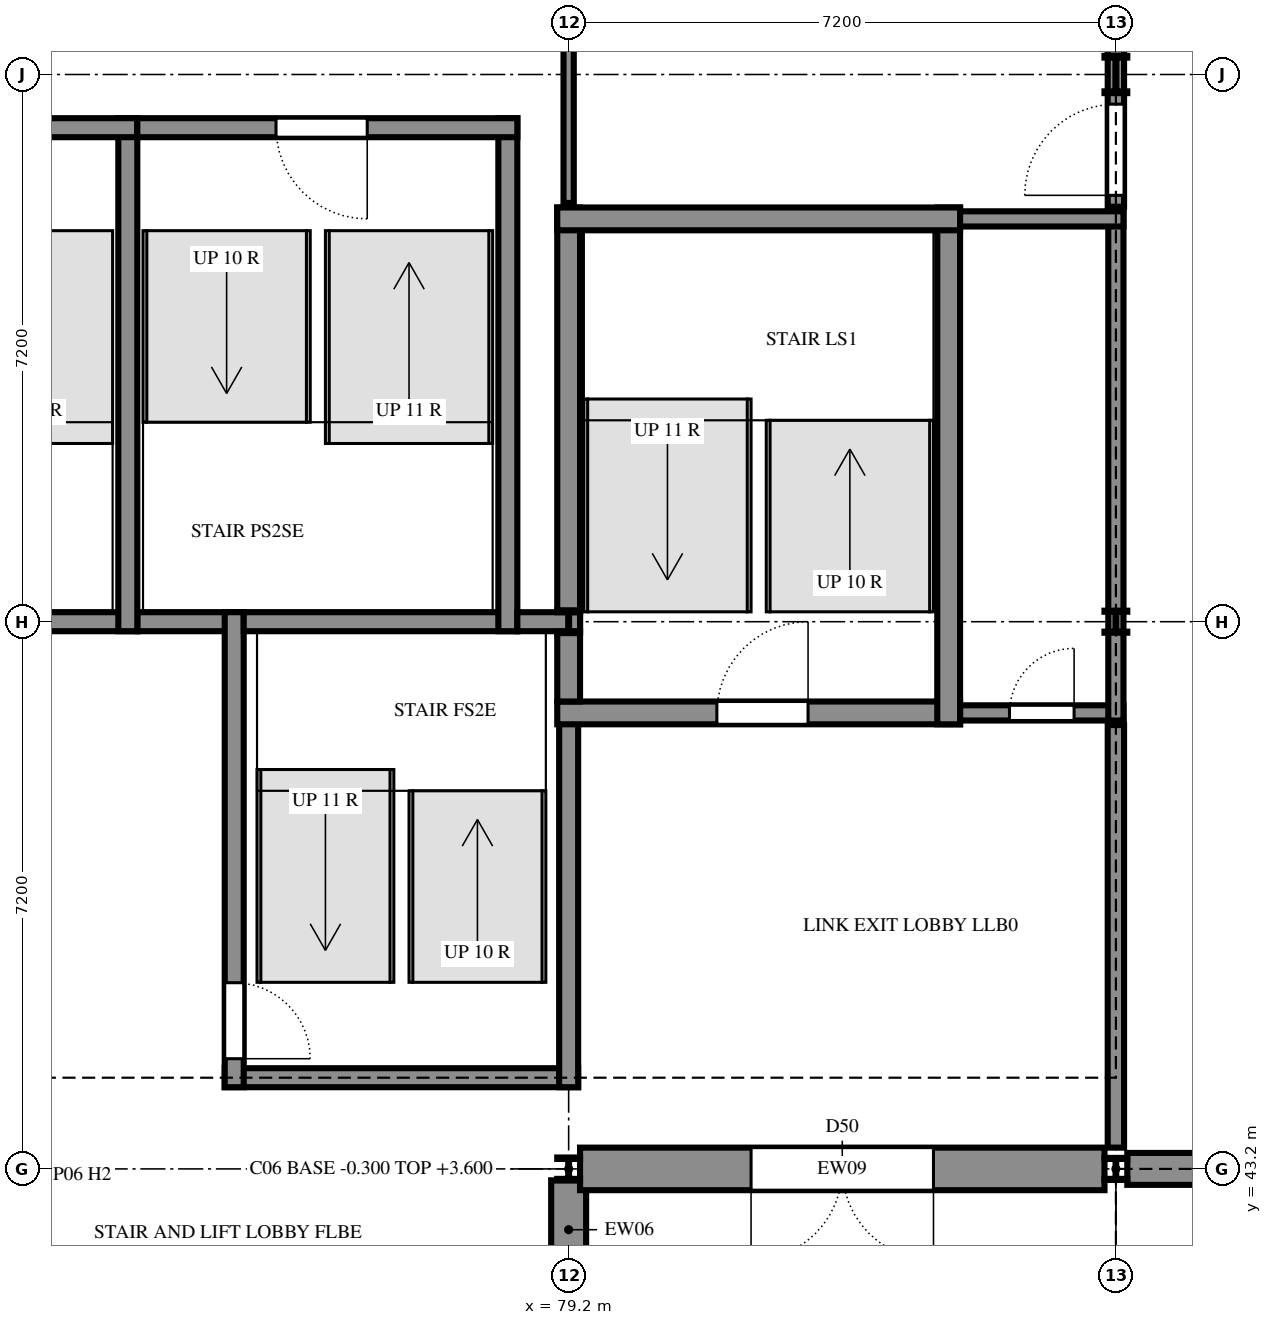
"""IFC4 building model, lengths in metres.
Left out: names, types, materials, properties, quantities, classifications, styles, units other than length and angle.
Written with IfcOpenShell. Run it as: python <this file> out.ifc"""

import sys

from ifc_helpers import new_model, si_unit, direction, frame, frame_2d, origin, origin_2d, place, context, subcontext, project, spatial, rectangle, i_section, extrude, element, fill, save


model = new_model("IFC4")
c1 = context("Model", 3, precision=1e-05, world=origin(), true_north=direction((0.0, 1.0)))
c2 = subcontext(c1, "Body", "Model", "MODEL_VIEW")
j1 = project(units=[si_unit("LENGTHUNIT", "METRE"), si_unit("PLANEANGLEUNIT", "RADIAN")], contexts=[c1])
p1 = place(None, origin())
s1 = spatial("IfcSite", under=j1, at=p1, CompositionType="ELEMENT")
p2 = place(p1, origin())
s2 = spatial("IfcBuilding", under=s1, at=p2, CompositionType="ELEMENT")
p3 = place(p2, origin())
s3 = spatial("IfcBuildingStorey", under=s2, at=p3, CompositionType="ELEMENT", Elevation=0.0)
for number, where, z_axis, x_axis in (
    (1, (79.2, 43.2, -0.3), (0.0, 0.0, 1.0), (1.0, 0.0, 0.0)),
    (2, (79.2, 50.4, -0.3), (0.0, 0.0, 1.0), (1.0, 0.0, 0.0)),
):
    element("IfcColumn", number, at=place(p3, frame(where, z_axis=z_axis, x_axis=x_axis)), inside=s3, PredefinedType="COLUMN", context=c2, shape_type="SweptSolid", body=[
        extrude(i_section(OverallWidth=0.3, OverallDepth=0.3, WebThickness=0.011, FlangeThickness=0.019, FilletRadius=0.027, at=origin_2d()), origin(), (0.0, 0.0, 1.0), 3.9),
    ])
for number, where, z_axis, x_axis in (
    (3, (86.4, 43.2, -0.3), (0.0, 0.0, 1.0), (1.0, 0.0, 0.0)),
    (4, (86.4, 50.4, -0.3), (0.0, 0.0, 1.0), (1.0, 0.0, 0.0)),
):
    element("IfcColumn", number, at=place(p3, frame(where, z_axis=z_axis, x_axis=x_axis)), inside=s3, PredefinedType="COLUMN", context=c2, shape_type="SweptSolid", body=[
        extrude(i_section(OverallWidth=0.3, OverallDepth=0.29, WebThickness=0.009, FlangeThickness=0.014, FilletRadius=0.027, at=origin_2d()), origin(), (0.0, 0.0, 1.0), 3.9),
    ])
p4 = place(p3, frame((86.4, 57.6, -0.3), z_axis=(0.0, 0.0, 1.0), x_axis=(1.0, 0.0, 0.0)))
e5 = element("IfcColumn", 5, at=p4, inside=s3, PredefinedType="COLUMN", context=c2, shape_type="SweptSolid", body=[
    extrude(i_section(OverallWidth=0.3, OverallDepth=0.49, WebThickness=0.012, FlangeThickness=0.023, FilletRadius=0.027, at=origin_2d()), origin(), (0.0, 0.0, 1.0), 3.9),
])
p5 = place(p3, frame((74.675, 44.4, 0.0), z_axis=(0.0, 0.0, 1.0), x_axis=(1.0, 0.0, 0.0)))
e6 = element("IfcWall", 6, at=p5, inside=s3, PredefinedType="SHEAR", context=c2, shape_type="SweptSolid", body=[
    extrude(rectangle(XDim=4.65, YDim=0.25, at=frame_2d((2.325, 0.0))), origin(), (0.0, 0.0, 1.0), 3.6),
])
p6 = place(p3, frame((79.2, 44.275, 0.0), z_axis=(0.0, 0.0, 1.0), x_axis=(0.0, 1.0, 0.0)))
e7 = element("IfcWall", 7, at=p6, inside=s3, PredefinedType="SHEAR", context=c2, shape_type="SweptSolid", body=[
    extrude(rectangle(XDim=5.075, YDim=0.25, at=frame_2d((2.538, 0.0))), origin(), (0.0, 0.0, 1.0), 3.6),
])
p7 = place(p3, frame((79.05, 49.2, 0.0), z_axis=(0.0, 0.0, 1.0), x_axis=(1.0, 0.0, 0.0)))
e8 = element("IfcWall", 8, at=p7, inside=s3, PredefinedType="SHEAR", context=c2, shape_type="SweptSolid", body=[
    extrude(rectangle(XDim=5.3, YDim=0.3, at=frame_2d((2.65, 0.0))), origin(), (0.0, 0.0, 1.0), 3.6),
])
p8 = place(p7, frame((2.1, 0.0, 0.0)))
e9 = element("IfcOpeningElement", 9, at=p8, cuts=e8, PredefinedType="OPENING", context=c2, shape_type="SweptSolid", body=[
    extrude(rectangle(XDim=1.2, YDim=2.4, at=frame_2d((0.6, 1.2))), frame((0.0, 0.16, 0.0), z_axis=(0.0, -1.0, 0.0), x_axis=(1.0, 0.0, 0.0)), (0.0, 0.0, 1.0), 0.32),
])
p9 = place(p3, frame((79.2, 49.35, 0.0), z_axis=(0.0, 0.0, 1.0), x_axis=(0.0, 1.0, 0.0)))
e10 = element("IfcWall", 10, at=p9, inside=s3, PredefinedType="SHEAR", context=c2, shape_type="SweptSolid", body=[
    extrude(rectangle(XDim=1.175, YDim=0.3, at=frame_2d((0.587, 0.0))), origin(), (0.0, 0.0, 1.0), 3.6),
])
p10 = place(p3, frame((84.35, 49.2, 0.0), z_axis=(0.0, 0.0, 1.0), x_axis=(1.0, 0.0, 0.0)))
e11 = element("IfcWall", 11, at=p10, inside=s3, PredefinedType="SHEAR", context=c2, shape_type="SweptSolid", body=[
    extrude(rectangle(XDim=2.15, YDim=0.2, at=frame_2d((1.075, 0.0))), origin(), (0.0, 0.0, 1.0), 3.6),
])
p11 = place(p10, frame((0.65, 0.0, 0.0)))
e12 = element("IfcOpeningElement", 12, at=p11, cuts=e11, PredefinedType="OPENING", context=c2, shape_type="SweptSolid", body=[
    extrude(rectangle(XDim=0.85, YDim=2.1, at=frame_2d((0.425, 1.05))), frame((0.0, 0.11, 0.0), z_axis=(0.0, -1.0, 0.0), x_axis=(1.0, 0.0, 0.0)), (0.0, 0.0, 1.0), 0.22),
])
p12 = place(p3, frame((84.2, 49.05, 0.0), z_axis=(0.0, 0.0, 1.0), x_axis=(0.0, 1.0, 0.0)))
e13 = element("IfcWall", 13, at=p12, inside=s3, PredefinedType="SHEAR", context=c2, shape_type="SweptSolid", body=[
    extrude(rectangle(XDim=6.8, YDim=0.3, at=frame_2d((3.4, 0.0))), origin(), (0.0, 0.0, 1.0), 3.6),
])
p13 = place(p3, frame((86.4, 49.1, 0.0), z_axis=(0.0, 0.0, 1.0), x_axis=(0.0, 1.0, 0.0)))
e14 = element("IfcWall", 14, at=p13, inside=s3, PredefinedType="SHEAR", context=c2, shape_type="SweptSolid", body=[
    extrude(rectangle(XDim=6.7, YDim=0.2, at=frame_2d((3.35, 0.0))), origin(), (0.0, 0.0, 1.0), 3.6),
])
p14 = place(p3, frame((68.275, 50.4, 0.0), z_axis=(0.0, 0.0, 1.0), x_axis=(1.0, 0.0, 0.0)))
e15 = element("IfcWall", 15, at=p14, inside=s3, PredefinedType="SHEAR", context=c2, shape_type="SweptSolid", body=[
    extrude(rectangle(XDim=5.25, YDim=0.25, at=frame_2d((2.625, 0.0))), origin(), (0.0, 0.0, 1.0), 3.6),
])
p15 = place(p3, frame((73.525, 50.4, 0.0), z_axis=(0.0, 0.0, 1.0), x_axis=(1.0, 0.0, 0.0)))
e16 = element("IfcWall", 16, at=p15, inside=s3, PredefinedType="SHEAR", context=c2, shape_type="SweptSolid", body=[
    extrude(rectangle(XDim=1.4, YDim=0.25, at=frame_2d((0.7, 0.0))), origin(), (0.0, 0.0, 1.0), 3.6),
])
p16 = place(p3, frame((73.4, 50.275, 0.0), z_axis=(0.0, 0.0, 1.0), x_axis=(0.0, 1.0, 0.0)))
e17 = element("IfcWall", 17, at=p16, inside=s3, PredefinedType="SHEAR", context=c2, shape_type="SweptSolid", body=[
    extrude(rectangle(XDim=6.75, YDim=0.25, at=frame_2d((3.375, 0.0))), origin(), (0.0, 0.0, 1.0), 3.6),
])
p17 = place(p3, frame((74.8, 50.525, 0.0), z_axis=(0.0, 0.0, 1.0), x_axis=(0.0, -1.0, 0.0)))
e18 = element("IfcWall", 18, at=p17, inside=s3, PredefinedType="SHEAR", context=c2, shape_type="SweptSolid", body=[
    extrude(rectangle(XDim=6.25, YDim=0.25, at=frame_2d((3.125, 0.0))), origin(), (0.0, 0.0, 1.0), 3.6),
])
p18 = place(p17, frame((4.875, 0.0, 0.0)))
e19 = element("IfcOpeningElement", 19, at=p18, cuts=e18, PredefinedType="OPENING", context=c2, shape_type="SweptSolid", body=[
    extrude(rectangle(XDim=1.0, YDim=2.4, at=frame_2d((0.5, 1.2))), frame((0.0, 0.135, 0.0), z_axis=(0.0, -1.0, 0.0), x_axis=(1.0, 0.0, 0.0)), (0.0, 0.0, 1.0), 0.27),
])
p19 = place(p3, frame((78.525, 50.4, 0.0), z_axis=(0.0, 0.0, 1.0), x_axis=(-1.0, 0.0, 0.0)))
e20 = element("IfcWall", 20, at=p19, inside=s3, PredefinedType="SHEAR", context=c2, shape_type="SweptSolid", body=[
    extrude(rectangle(XDim=3.6, YDim=0.25, at=frame_2d((1.8, 0.0))), origin(), (0.0, 0.0, 1.0), 3.6),
])
p20 = place(p3, frame((78.4, 50.275, 0.0), z_axis=(0.0, 0.0, 1.0), x_axis=(0.0, 1.0, 0.0)))
e21 = element("IfcWall", 21, at=p20, inside=s3, PredefinedType="SHEAR", context=c2, shape_type="SweptSolid", body=[
    extrude(rectangle(XDim=6.75, YDim=0.25, at=frame_2d((3.375, 0.0))), origin(), (0.0, 0.0, 1.0), 3.6),
])
p21 = place(p3, frame((79.35, 50.4, 0.0), z_axis=(0.0, 0.0, 1.0), x_axis=(-1.0, 0.0, 0.0)))
e22 = element("IfcWall", 22, at=p21, inside=s3, PredefinedType="SHEAR", context=c2, shape_type="SweptSolid", body=[
    extrude(rectangle(XDim=0.825, YDim=0.25, at=frame_2d((0.413, 0.0))), origin(), (0.0, 0.0, 1.0), 3.6),
])
p22 = place(p3, frame((79.2, 55.85, 0.0), z_axis=(0.0, 0.0, 1.0), x_axis=(0.0, -1.0, 0.0)))
e23 = element("IfcWall", 23, at=p22, inside=s3, PredefinedType="SHEAR", context=c2, shape_type="SweptSolid", body=[
    extrude(rectangle(XDim=5.325, YDim=0.3, at=frame_2d((2.663, 0.0))), origin(), (0.0, 0.0, 1.0), 3.6),
])
p23 = place(p3, frame((84.35, 55.7, 0.0), z_axis=(0.0, 0.0, 1.0), x_axis=(-1.0, 0.0, 0.0)))
e24 = element("IfcWall", 24, at=p23, inside=s3, PredefinedType="SHEAR", context=c2, shape_type="SweptSolid", body=[
    extrude(rectangle(XDim=5.3, YDim=0.3, at=frame_2d((2.65, 0.0))), origin(), (0.0, 0.0, 1.0), 3.6),
])
p24 = place(p3, frame((86.5, 55.7, 0.0), z_axis=(0.0, 0.0, 1.0), x_axis=(-1.0, 0.0, 0.0)))
e25 = element("IfcWall", 25, at=p24, inside=s3, PredefinedType="SHEAR", context=c2, shape_type="SweptSolid", body=[
    extrude(rectangle(XDim=2.15, YDim=0.2, at=frame_2d((1.075, 0.0))), origin(), (0.0, 0.0, 1.0), 3.6),
])
p25 = place(p3, frame((73.525, 56.9, 0.0), z_axis=(0.0, 0.0, 1.0), x_axis=(-1.0, 0.0, 0.0)))
e26 = element("IfcWall", 26, at=p25, inside=s3, PredefinedType="SHEAR", context=c2, shape_type="SweptSolid", body=[
    extrude(rectangle(XDim=5.25, YDim=0.25, at=frame_2d((2.625, 0.0))), origin(), (0.0, 0.0, 1.0), 3.6),
])
p26 = place(p25, frame((2.575, 0.0, 0.0)))
e27 = element("IfcOpeningElement", 27, at=p26, cuts=e26, PredefinedType="OPENING", context=c2, shape_type="SweptSolid", body=[
    extrude(rectangle(XDim=1.2, YDim=2.4, at=frame_2d((0.6, 1.2))), frame((0.0, 0.135, 0.0), z_axis=(0.0, -1.0, 0.0), x_axis=(1.0, 0.0, 0.0)), (0.0, 0.0, 1.0), 0.27),
])
p27 = place(p3, frame((78.525, 56.9, 0.0), z_axis=(0.0, 0.0, 1.0), x_axis=(-1.0, 0.0, 0.0)))
e28 = element("IfcWall", 28, at=p27, inside=s3, PredefinedType="SHEAR", context=c2, shape_type="SweptSolid", body=[
    extrude(rectangle(XDim=5.0, YDim=0.25, at=frame_2d((2.5, 0.0))), origin(), (0.0, 0.0, 1.0), 3.6),
])
p28 = place(p27, frame((1.975, 0.0, 0.0)))
e29 = element("IfcOpeningElement", 29, at=p28, cuts=e28, PredefinedType="OPENING", context=c2, shape_type="SweptSolid", body=[
    extrude(rectangle(XDim=1.2, YDim=2.4, at=frame_2d((0.6, 1.2))), frame((0.0, 0.135, 0.0), z_axis=(0.0, -1.0, 0.0), x_axis=(1.0, 0.0, 0.0)), (0.0, 0.0, 1.0), 0.27),
])
p29 = place(p3, frame((79.2, 41.75, 0.0), z_axis=(0.0, 0.0, 1.0), x_axis=(0.0, 1.0, 0.0)))
e30 = element("IfcWall", 30, at=p29, inside=s3, PredefinedType="SOLIDWALL", context=c2, shape_type="SweptSolid", body=[
    extrude(rectangle(XDim=1.3, YDim=0.46, at=frame_2d((0.65, 0.0))), origin(), (0.0, 0.0, 1.0), 3.22),
])
p30 = place(p3, frame((86.55, 43.2, 0.0), z_axis=(0.0, 0.0, 1.0), x_axis=(1.0, 0.0, 0.0)))
e31 = element("IfcWall", 31, at=p30, inside=s3, PredefinedType="SOLIDWALL", context=c2, shape_type="SweptSolid", body=[
    extrude(rectangle(XDim=6.9, YDim=0.42, at=frame_2d((3.45, 0.0))), origin(), (0.0, 0.0, 1.0), 3.6),
])
p31 = place(p3, frame((79.35, 43.2, 0.0), z_axis=(0.0, 0.0, 1.0), x_axis=(1.0, 0.0, 0.0)))
e32 = element("IfcWall", 32, at=p31, inside=s3, PredefinedType="SOLIDWALL", context=c2, shape_type="SweptSolid", body=[
    extrude(rectangle(XDim=6.9, YDim=0.56, at=frame_2d((3.45, 0.0))), origin(), (0.0, 0.0, 1.0), 3.12),
])
p32 = place(p31, frame((2.25, 0.0, 0.015)))
e33 = element("IfcOpeningElement", 33, at=p32, cuts=e32, PredefinedType="OPENING", context=c2, shape_type="SweptSolid", body=[
    extrude(rectangle(XDim=2.4, YDim=2.1, at=frame_2d((1.2, 1.05))), frame((0.0, 0.29, 0.0), z_axis=(0.0, -1.0, 0.0), x_axis=(1.0, 0.0, 0.0)), (0.0, 0.0, 1.0), 0.58),
])
p33 = place(p3, frame((79.2, 61.2, 0.0), z_axis=(0.0, 0.0, 1.0), x_axis=(0.0, -1.0, 0.0)))
e34 = element("IfcWall", 34, at=p33, inside=s3, PredefinedType="PARTITIONING", context=c2, shape_type="SweptSolid", body=[
    extrude(rectangle(XDim=5.29, YDim=0.135, at=frame_2d((2.645, 0.0))), origin(), (0.0, 0.0, 1.0), 3.01),
])
p34 = place(p33, frame((1.35, 0.0, 0.0)))
e35 = element("IfcOpeningElement", 35, at=p34, cuts=e34, PredefinedType="OPENING", context=c2, shape_type="SweptSolid", body=[
    extrude(rectangle(XDim=1.8, YDim=2.4, at=frame_2d((0.9, 1.2))), frame((0.0, 0.077, 0.0), z_axis=(0.0, -1.0, 0.0), x_axis=(1.0, 0.0, 0.0)), (0.0, 0.0, 1.0), 0.155),
])
p35 = place(p3, frame((86.4, 43.48, 0.0), z_axis=(0.0, 0.0, 1.0), x_axis=(0.0, 1.0, 0.0)))
e36 = element("IfcWall", 36, at=p35, inside=s3, PredefinedType="PARTITIONING", context=c2, shape_type="SweptSolid", body=[
    extrude(rectangle(XDim=5.56, YDim=0.215, at=frame_2d((2.78, 0.0))), origin(), (0.0, 0.0, 1.0), 3.15),
])
p36 = place(p3, frame((86.4, 55.86, 0.0), z_axis=(0.0, 0.0, 1.0), x_axis=(0.0, 1.0, 0.0)))
e37 = element("IfcWall", 37, at=p36, inside=s3, PredefinedType="PARTITIONING", context=c2, shape_type="SweptSolid", body=[
    extrude(rectangle(XDim=1.985, YDim=0.215, at=frame_2d((0.992, 0.0))), origin(), (0.0, 0.0, 1.0), 3.6),
])
p37 = place(p36, frame((0.15, 0.0, 0.0)))
e38 = element("IfcOpeningElement", 38, at=p37, cuts=e37, PredefinedType="OPENING", context=c2, shape_type="SweptSolid", body=[
    extrude(rectangle(XDim=1.2, YDim=2.4, at=frame_2d((0.6, 1.2))), frame((0.0, 0.117, 0.0), z_axis=(0.0, -1.0, 0.0), x_axis=(1.0, 0.0, 0.0)), (0.0, 0.0, 1.0), 0.235),
])
p38 = place(p3, frame((86.4, 57.845, 0.0), z_axis=(0.0, 0.0, 1.0), x_axis=(0.0, 1.0, 0.0)))
e39 = element("IfcWall", 39, at=p38, inside=s3, PredefinedType="PARTITIONING", context=c2, shape_type="SweptSolid", body=[
    extrude(rectangle(XDim=6.71, YDim=0.215, at=frame_2d((3.355, 0.0))), origin(), (0.0, 0.0, 1.0), 3.12),
])
p39 = place(p38, frame((4.965, 0.0, 0.0)))
e40 = element("IfcOpeningElement", 40, at=p39, cuts=e39, PredefinedType="OPENING", context=c2, shape_type="SweptSolid", body=[
    extrude(rectangle(XDim=1.5, YDim=2.1, at=frame_2d((0.75, 1.05))), frame((0.0, 0.117, 0.0), z_axis=(0.0, -1.0, 0.0), x_axis=(1.0, 0.0, 0.0)), (0.0, 0.0, 1.0), 0.235),
])
p40 = place(p32, frame((2.4, 0.0, 0.0), z_axis=(0.0, 0.0, 1.0), x_axis=(-1.0, 0.0, 0.0)))
e41 = element("IfcDoor", 41, at=p40, inside=s3, OperationType="DOUBLE_DOOR_SINGLE_SWING", PredefinedType="DOOR", context=c2, shape_type="SweptSolid", body=[
    extrude(rectangle(XDim=2.4, YDim=2.1, at=frame_2d((1.2, 1.05))), frame((0.0, 0.025, 0.0), z_axis=(0.0, -1.0, 0.0), x_axis=(1.0, 0.0, 0.0)), (0.0, 0.0, 1.0), 0.05),
])
fill(e33, e41)
p41 = place(p18, origin())
e42 = element("IfcDoor", 42, at=p41, inside=s3, OperationType="SINGLE_SWING_LEFT", PredefinedType="DOOR", context=c2, shape_type="SweptSolid", body=[
    extrude(rectangle(XDim=1.0, YDim=2.4, at=frame_2d((0.5, 1.2))), frame((0.0, 0.025, 0.0), z_axis=(0.0, -1.0, 0.0), x_axis=(1.0, 0.0, 0.0)), (0.0, 0.0, 1.0), 0.05),
])
fill(e19, e42)
p42 = place(p28, origin())
e43 = element("IfcDoor", 43, at=p42, inside=s3, OperationType="SINGLE_SWING_RIGHT", PredefinedType="DOOR", context=c2, shape_type="SweptSolid", body=[
    extrude(rectangle(XDim=1.2, YDim=2.4, at=frame_2d((0.6, 1.2))), frame((0.0, 0.025, 0.0), z_axis=(0.0, -1.0, 0.0), x_axis=(1.0, 0.0, 0.0)), (0.0, 0.0, 1.0), 0.05),
])
fill(e29, e43)
p43 = place(p8, origin())
e44 = element("IfcDoor", 44, at=p43, inside=s3, OperationType="SINGLE_SWING_LEFT", PredefinedType="DOOR", context=c2, shape_type="SweptSolid", body=[
    extrude(rectangle(XDim=1.2, YDim=2.4, at=frame_2d((0.6, 1.2))), frame((0.0, 0.025, 0.0), z_axis=(0.0, -1.0, 0.0), x_axis=(1.0, 0.0, 0.0)), (0.0, 0.0, 1.0), 0.05),
])
fill(e9, e44)
p44 = place(p11, origin())
e45 = element("IfcDoor", 45, at=p44, inside=s3, OperationType="SINGLE_SWING_LEFT", PredefinedType="DOOR", context=c2, shape_type="SweptSolid", body=[
    extrude(rectangle(XDim=0.85, YDim=2.1, at=frame_2d((0.425, 1.05))), frame((0.0, 0.025, 0.0), z_axis=(0.0, -1.0, 0.0), x_axis=(1.0, 0.0, 0.0)), (0.0, 0.0, 1.0), 0.05),
])
fill(e12, e45)
p45 = place(p37, origin())
e46 = element("IfcDoor", 46, at=p45, inside=s3, OperationType="SINGLE_SWING_RIGHT", PredefinedType="DOOR", context=c2, shape_type="SweptSolid", body=[
    extrude(rectangle(XDim=1.2, YDim=2.4, at=frame_2d((0.6, 1.2))), frame((0.0, 0.025, 0.0), z_axis=(0.0, -1.0, 0.0), x_axis=(1.0, 0.0, 0.0)), (0.0, 0.0, 1.0), 0.05),
])
fill(e38, e46)
save(model, sys.argv[1])
